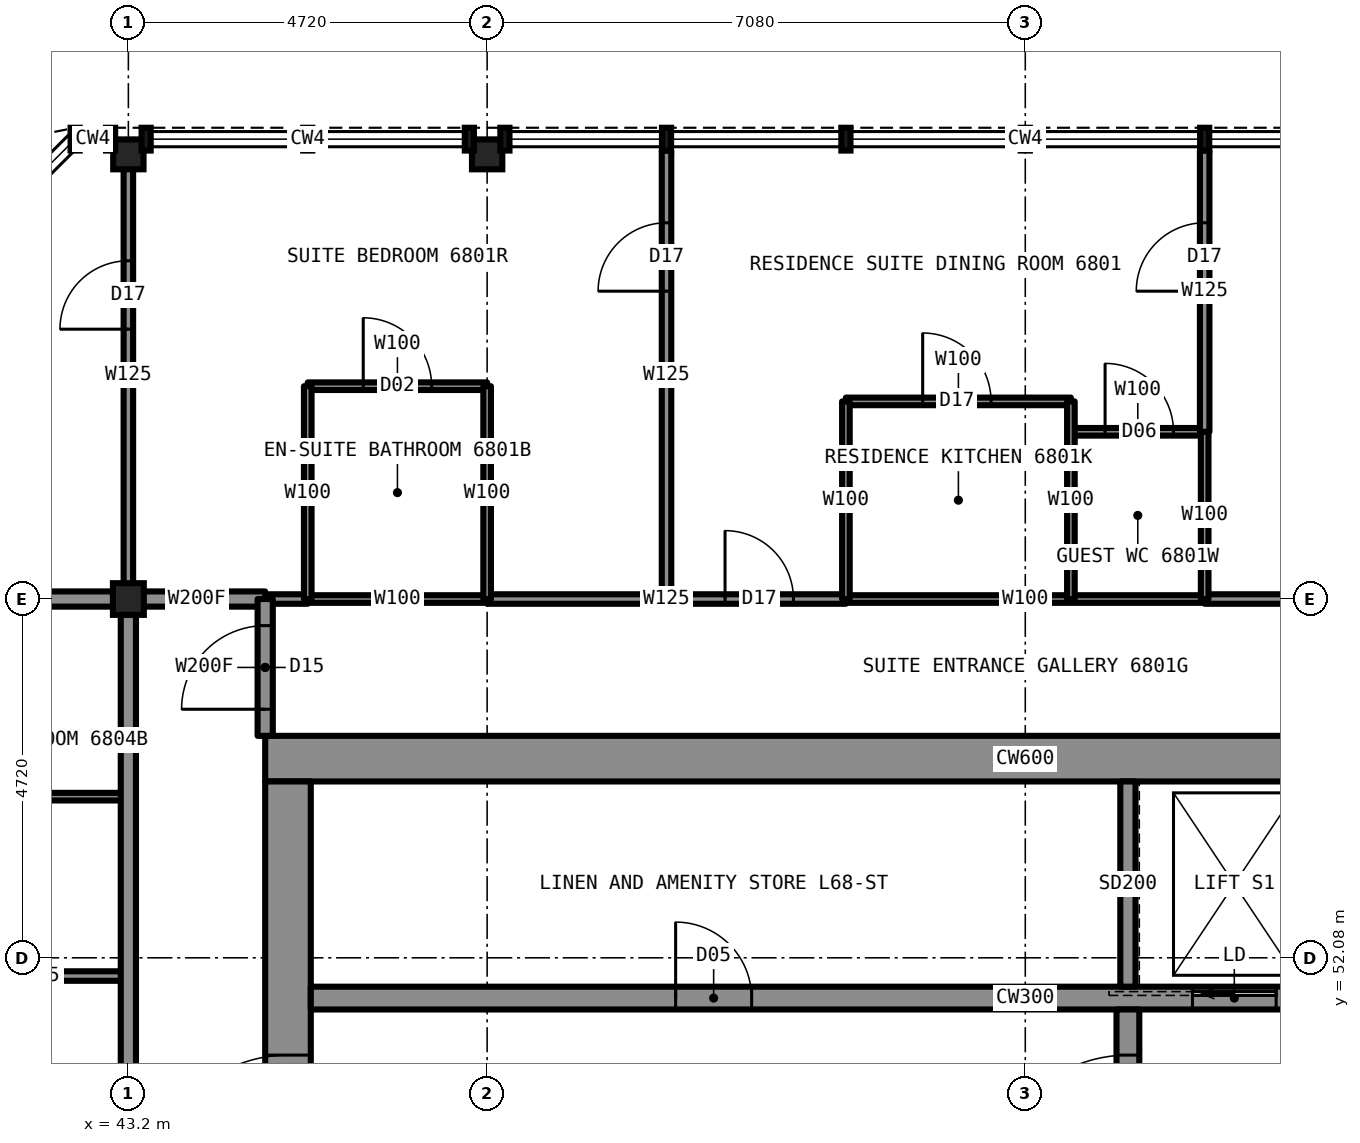
"""IFC4 building model, lengths in metres.
Left out: names, types, materials, properties, quantities, classifications, styles, units other than length and angle.
Written with IfcOpenShell. Run it as: python <this file> out.ifc"""

import sys

from ifc_helpers import new_model, si_unit, direction, frame, frame_2d, origin, origin_2d, place, context, subcontext, project, spatial, rectangle, i_section, extrude, element, fill, save


model = new_model("IFC4")
c1 = context("Model", 3, precision=1e-05, world=origin(), true_north=direction((0.0, 1.0)))
c2 = subcontext(c1, "Body", "Model", "MODEL_VIEW")
j1 = project(units=[si_unit("LENGTHUNIT", "METRE"), si_unit("PLANEANGLEUNIT", "RADIAN")], contexts=[c1])
p1 = place(None, origin())
s1 = spatial("IfcSite", under=j1, at=p1, CompositionType="ELEMENT")
p2 = place(p1, origin())
s2 = spatial("IfcBuilding", under=s1, at=p2, CompositionType="ELEMENT")
p3 = place(p2, frame((0.0, 0.0, 247.7)))
s3 = spatial("IfcBuildingStorey", under=s2, at=p3, CompositionType="ELEMENT", Elevation=247.7)
for number, where, z_axis, x_axis in (
    (1, (43.2, 62.65, 0.0), (0.0, 0.0, 1.0), (1.0, 0.0, 0.0)),
    (2, (47.92, 62.65, 0.0), (0.0, 0.0, 1.0), (1.0, 0.0, 0.0)),
):
    element("IfcColumn", number, at=place(p3, frame(where, z_axis=z_axis, x_axis=x_axis)), inside=s3, PredefinedType="COLUMN", context=c2, shape_type="SweptSolid", body=[
        extrude(i_section(OverallWidth=0.399, OverallDepth=0.394, WebThickness=0.023, FlangeThickness=0.037, at=origin_2d()), origin(), (0.0, 0.0, 1.0), 3.5),
    ])
p4 = place(p3, frame((43.2, 56.8, 0.0), z_axis=(0.0, 0.0, 1.0), x_axis=(1.0, 0.0, 0.0)))
e3 = element("IfcColumn", 3, at=p4, inside=s3, PredefinedType="COLUMN", context=c2, shape_type="SweptSolid", body=[
    extrude(i_section(OverallWidth=0.406, OverallDepth=0.417, WebThickness=0.03, FlangeThickness=0.048, at=origin_2d()), origin(), (0.0, 0.0, 1.0), 3.5),
])
p5 = place(p3, frame((45.0, 54.7, 0.0), z_axis=(0.0, 0.0, 1.0), x_axis=(1.0, 0.0, 0.0)))
e4 = element("IfcWall", 4, at=p5, inside=s3, PredefinedType="SHEAR", context=c2, shape_type="SweptSolid", body=[
    extrude(rectangle(XDim=20.0, YDim=0.6, at=frame_2d((10.0, 0.0))), origin(), (0.0, 0.0, 1.0), 3.5),
])
p6 = place(p3, frame((45.3, 35.6, 0.0), z_axis=(0.0, 0.0, 1.0), x_axis=(0.0, 1.0, 0.0)))
e5 = element("IfcWall", 5, at=p6, inside=s3, PredefinedType="SHEAR", context=c2, shape_type="SweptSolid", body=[
    extrude(rectangle(XDim=18.8, YDim=0.6, at=frame_2d((9.4, 0.0))), origin(), (0.0, 0.0, 1.0), 3.5),
])
p7 = place(p6, frame((13.4, 0.0, 0.0)))
e6 = element("IfcOpeningElement", 6, at=p7, cuts=e5, PredefinedType="OPENING", context=c2, shape_type="SweptSolid", body=[
    extrude(rectangle(XDim=1.8, YDim=2.2, at=frame_2d((0.9, 1.1))), frame((0.0, 0.31, 0.0), z_axis=(0.0, -1.0, 0.0), x_axis=(1.0, 0.0, 0.0)), (0.0, 0.0, 1.0), 0.62),
])
p8 = place(p6, frame((3.6, 0.0, 0.0)))
e7 = element("IfcOpeningElement", 7, at=p8, cuts=e5, PredefinedType="OPENING", context=c2, shape_type="SweptSolid", body=[
    extrude(rectangle(XDim=1.8, YDim=2.2, at=frame_2d((0.9, 1.1))), frame((0.0, 0.31, 0.0), z_axis=(0.0, -1.0, 0.0), x_axis=(1.0, 0.0, 0.0)), (0.0, 0.0, 1.0), 0.62),
])
p9 = place(p6, frame((6.4, 0.0, 0.0)))
e8 = element("IfcOpeningElement", 8, at=p9, cuts=e5, PredefinedType="OPENING", context=c2, shape_type="SweptSolid", body=[
    extrude(rectangle(XDim=1.2, YDim=2.2, at=frame_2d((0.6, 1.1))), frame((0.0, 0.31, 0.0), z_axis=(0.0, -1.0, 0.0), x_axis=(1.0, 0.0, 0.0)), (0.0, 0.0, 1.0), 0.62),
])
p10 = place(p3, frame((45.6, 51.55, 0.0), z_axis=(0.0, 0.0, 1.0), x_axis=(1.0, 0.0, 0.0)))
e9 = element("IfcWall", 9, at=p10, inside=s3, PredefinedType="SHEAR", context=c2, shape_type="SweptSolid", body=[
    extrude(rectangle(XDim=18.8, YDim=0.3, at=frame_2d((9.4, 0.0))), origin(), (0.0, 0.0, 1.0), 3.5),
])
p11 = place(p10, frame((4.8, 0.0, 0.0)))
e10 = element("IfcOpeningElement", 10, at=p11, cuts=e9, PredefinedType="OPENING", context=c2, shape_type="SweptSolid", body=[
    extrude(rectangle(XDim=1.0, YDim=2.1, at=frame_2d((0.5, 1.05))), frame((0.0, 0.16, 0.0), z_axis=(0.0, -1.0, 0.0), x_axis=(1.0, 0.0, 0.0)), (0.0, 0.0, 1.0), 0.32),
])
p12 = place(p10, frame((11.6, 0.0, 0.0)))
e11 = element("IfcOpeningElement", 11, at=p12, cuts=e9, PredefinedType="OPENING", context=c2, shape_type="SweptSolid", body=[
    extrude(rectangle(XDim=1.1, YDim=2.2, at=frame_2d((0.55, 1.1))), frame((0.0, 0.16, 0.0), z_axis=(0.0, -1.0, 0.0), x_axis=(1.0, 0.0, 0.0)), (0.0, 0.0, 1.0), 0.32),
])
p13 = place(p10, frame((14.3, 0.0, 0.0)))
e12 = element("IfcOpeningElement", 12, at=p13, cuts=e9, PredefinedType="OPENING", context=c2, shape_type="SweptSolid", body=[
    extrude(rectangle(XDim=1.1, YDim=2.2, at=frame_2d((0.55, 1.1))), frame((0.0, 0.16, 0.0), z_axis=(0.0, -1.0, 0.0), x_axis=(1.0, 0.0, 0.0)), (0.0, 0.0, 1.0), 0.32),
])
p14 = place(p3, frame((56.35, 41.9, 0.0), z_axis=(0.0, 0.0, 1.0), x_axis=(0.0, 1.0, 0.0)))
e13 = element("IfcWall", 13, at=p14, inside=s3, PredefinedType="SHEAR", context=c2, shape_type="SweptSolid", body=[
    extrude(rectangle(XDim=9.5, YDim=0.3, at=frame_2d((4.75, 0.0))), origin(), (0.0, 0.0, 1.0), 3.5),
])
p15 = place(p14, frame((7.1, 0.0, 0.0)))
e14 = element("IfcOpeningElement", 14, at=p15, cuts=e13, PredefinedType="OPENING", context=c2, shape_type="SweptSolid", body=[
    extrude(rectangle(XDim=1.8, YDim=2.2, at=frame_2d((0.9, 1.1))), frame((0.0, 0.16, 0.0), z_axis=(0.0, -1.0, 0.0), x_axis=(1.0, 0.0, 0.0)), (0.0, 0.0, 1.0), 0.32),
])
p16 = place(p3, frame((45.56, 56.8, 0.0), z_axis=(0.0, 0.0, 1.0), x_axis=(1.0, 0.0, 0.0)))
e15 = element("IfcWall", 15, at=p16, inside=s3, PredefinedType="PARTITIONING", context=c2, shape_type="SweptSolid", body=[
    extrude(rectangle(XDim=2.36, YDim=0.1, at=frame_2d((1.18, 0.0))), origin(), (0.0, 0.0, 1.0), 3.33),
])
p17 = place(p3, frame((52.64, 56.8, 0.0), z_axis=(0.0, 0.0, 1.0), x_axis=(1.0, 0.0, 0.0)))
e16 = element("IfcWall", 16, at=p17, inside=s3, PredefinedType="PARTITIONING", context=c2, shape_type="SweptSolid", body=[
    extrude(rectangle(XDim=4.72, YDim=0.1, at=frame_2d((2.36, 0.0))), origin(), (0.0, 0.0, 1.0), 3.33),
])
p18 = place(p3, frame((43.2, 56.8, 0.0), z_axis=(0.0, 0.0, 1.0), x_axis=(1.0, 0.0, 0.0)))
e17 = element("IfcWall", 17, at=p18, inside=s3, PredefinedType="PARTITIONING", context=c2, shape_type="SweptSolid", body=[
    extrude(rectangle(XDim=1.8, YDim=0.2, at=frame_2d((0.9, 0.0))), origin(), (0.0, 0.0, 1.0), 3.33),
])
p19 = place(p3, frame((37.3, 56.8, 0.0), z_axis=(0.0, 0.0, 1.0), x_axis=(1.0, 0.0, 0.0)))
e18 = element("IfcWall", 18, at=p19, inside=s3, PredefinedType="PARTITIONING", context=c2, shape_type="SweptSolid", body=[
    extrude(rectangle(XDim=5.9, YDim=0.2, at=frame_2d((2.95, 0.0))), origin(), (0.0, 0.0, 1.0), 2.573),
])
p20 = place(p3, frame((45.0, 56.8, 0.0), z_axis=(0.0, 0.0, 1.0), x_axis=(1.0, 0.0, 0.0)))
e19 = element("IfcWall", 19, at=p20, inside=s3, PredefinedType="PARTITIONING", context=c2, shape_type="SweptSolid", body=[
    extrude(rectangle(XDim=0.56, YDim=0.125, at=frame_2d((0.28, 0.0))), origin(), (0.0, 0.0, 1.0), 3.33),
])
p21 = place(p3, frame((47.92, 56.8, 0.0), z_axis=(0.0, 0.0, 1.0), x_axis=(1.0, 0.0, 0.0)))
e20 = element("IfcWall", 20, at=p21, inside=s3, PredefinedType="PARTITIONING", context=c2, shape_type="SweptSolid", body=[
    extrude(rectangle(XDim=4.72, YDim=0.125, at=frame_2d((2.36, 0.0))), origin(), (0.0, 0.0, 1.0), 3.33),
])
p22 = place(p21, frame((3.13, 0.0, 0.0)))
e21 = element("IfcOpeningElement", 21, at=p22, cuts=e20, PredefinedType="OPENING", context=c2, shape_type="SweptSolid", body=[
    extrude(rectangle(XDim=0.9, YDim=2.2, at=frame_2d((0.45, 1.1))), frame((0.0, 0.073, 0.0), z_axis=(0.0, -1.0, 0.0), x_axis=(1.0, 0.0, 0.0)), (0.0, 0.0, 1.0), 0.145),
])
p23 = place(p3, frame((57.36, 56.8, 0.0), z_axis=(0.0, 0.0, 1.0), x_axis=(1.0, 0.0, 0.0)))
e22 = element("IfcWall", 22, at=p23, inside=s3, PredefinedType="PARTITIONING", context=c2, shape_type="SweptSolid", body=[
    extrude(rectangle(XDim=7.08, YDim=0.125, at=frame_2d((3.54, 0.0))), origin(), (0.0, 0.0, 1.0), 3.33),
])
p24 = place(p3, frame((55.6, 59.0, 0.0), z_axis=(0.0, 0.0, 1.0), x_axis=(1.0, 0.0, 0.0)))
e23 = element("IfcWall", 23, at=p24, inside=s3, PredefinedType="PARTITIONING", context=c2, shape_type="SweptSolid", body=[
    extrude(rectangle(XDim=1.76, YDim=0.1, at=frame_2d((0.88, 0.0))), origin(), (0.0, 0.0, 1.0), 3.33),
])
p25 = place(p24, frame((0.45, 0.0, 0.0)))
e24 = element("IfcOpeningElement", 24, at=p25, cuts=e23, PredefinedType="OPENING", context=c2, shape_type="SweptSolid", body=[
    extrude(rectangle(XDim=0.9, YDim=2.1, at=frame_2d((0.45, 1.05))), frame((0.0, 0.06, 0.0), z_axis=(0.0, -1.0, 0.0), x_axis=(1.0, 0.0, 0.0)), (0.0, 0.0, 1.0), 0.12),
])
p26 = place(p3, frame((52.64, 59.4, 0.0), z_axis=(0.0, 0.0, 1.0), x_axis=(1.0, 0.0, 0.0)))
e25 = element("IfcWall", 25, at=p26, inside=s3, PredefinedType="PARTITIONING", context=c2, shape_type="SweptSolid", body=[
    extrude(rectangle(XDim=2.96, YDim=0.1, at=frame_2d((1.48, 0.0))), origin(), (0.0, 0.0, 1.0), 3.33),
])
p27 = place(p26, frame((1.01, 0.0, 0.0)))
e26 = element("IfcOpeningElement", 26, at=p27, cuts=e25, PredefinedType="OPENING", context=c2, shape_type="SweptSolid", body=[
    extrude(rectangle(XDim=0.9, YDim=2.2, at=frame_2d((0.45, 1.1))), frame((0.0, 0.06, 0.0), z_axis=(0.0, -1.0, 0.0), x_axis=(1.0, 0.0, 0.0)), (0.0, 0.0, 1.0), 0.12),
])
p28 = place(p3, frame((45.56, 59.6, 0.0), z_axis=(0.0, 0.0, 1.0), x_axis=(1.0, 0.0, 0.0)))
e27 = element("IfcWall", 27, at=p28, inside=s3, PredefinedType="PARTITIONING", context=c2, shape_type="SweptSolid", body=[
    extrude(rectangle(XDim=2.36, YDim=0.1, at=frame_2d((1.18, 0.0))), origin(), (0.0, 0.0, 1.0), 3.33),
])
p29 = place(p28, frame((0.73, 0.0, 0.0)))
e28 = element("IfcOpeningElement", 28, at=p29, cuts=e27, PredefinedType="OPENING", context=c2, shape_type="SweptSolid", body=[
    extrude(rectangle(XDim=0.9, YDim=2.1, at=frame_2d((0.45, 1.05))), frame((0.0, 0.06, 0.0), z_axis=(0.0, -1.0, 0.0), x_axis=(1.0, 0.0, 0.0)), (0.0, 0.0, 1.0), 0.12),
])
p30 = place(p3, frame((40.8, 51.84, 0.0), z_axis=(0.0, 0.0, 1.0), x_axis=(1.0, 0.0, 0.0)))
e29 = element("IfcWall", 29, at=p30, inside=s3, PredefinedType="PARTITIONING", context=c2, shape_type="SweptSolid", body=[
    extrude(rectangle(XDim=2.4, YDim=0.125, at=frame_2d((1.2, 0.0))), origin(), (0.0, 0.0, 1.0), 3.33),
])
p31 = place(p3, frame((40.2, 54.2, 0.0), z_axis=(0.0, 0.0, 1.0), x_axis=(1.0, 0.0, 0.0)))
e30 = element("IfcWall", 30, at=p31, inside=s3, PredefinedType="PARTITIONING", context=c2, shape_type="SweptSolid", body=[
    extrude(rectangle(XDim=3.0, YDim=0.1, at=frame_2d((1.5, 0.0))), origin(), (0.0, 0.0, 1.0), 3.33),
])
p32 = place(p3, frame((45.0, 55.0, 0.0), z_axis=(0.0, 0.0, 1.0), x_axis=(0.0, 1.0, 0.0)))
e31 = element("IfcWall", 31, at=p32, inside=s3, PredefinedType="PARTITIONING", context=c2, shape_type="SweptSolid", body=[
    extrude(rectangle(XDim=1.8, YDim=0.2, at=frame_2d((0.9, 0.0))), origin(), (0.0, 0.0, 1.0), 3.33),
])
p33 = place(p32, frame((0.35, 0.0, 0.0)))
e32 = element("IfcOpeningElement", 32, at=p33, cuts=e31, PredefinedType="OPENING", context=c2, shape_type="SweptSolid", body=[
    extrude(rectangle(XDim=1.1, YDim=2.2, at=frame_2d((0.55, 1.1))), frame((0.0, 0.11, 0.0), z_axis=(0.0, -1.0, 0.0), x_axis=(1.0, 0.0, 0.0)), (0.0, 0.0, 1.0), 0.22),
])
p34 = place(p3, frame((43.2, 33.2, 0.0), z_axis=(0.0, 0.0, 1.0), x_axis=(0.0, 1.0, 0.0)))
e33 = element("IfcWall", 33, at=p34, inside=s3, PredefinedType="PARTITIONING", context=c2, shape_type="SweptSolid", body=[
    extrude(rectangle(XDim=23.6, YDim=0.2, at=frame_2d((11.8, 0.0))), origin(), (0.0, 0.0, 1.0), 3.33),
])
p35 = place(p34, frame((8.95, 0.0, 0.0)))
e34 = element("IfcOpeningElement", 34, at=p35, cuts=e33, PredefinedType="OPENING", context=c2, shape_type="SweptSolid", body=[
    extrude(rectangle(XDim=1.1, YDim=2.2, at=frame_2d((0.55, 1.1))), frame((0.0, 0.11, 0.0), z_axis=(0.0, -1.0, 0.0), x_axis=(1.0, 0.0, 0.0)), (0.0, 0.0, 1.0), 0.22),
])
p36 = place(p34, frame((0.7, 0.0, 0.0)))
e35 = element("IfcOpeningElement", 35, at=p36, cuts=e33, PredefinedType="OPENING", context=c2, shape_type="SweptSolid", body=[
    extrude(rectangle(XDim=1.0, YDim=2.1, at=frame_2d((0.5, 1.05))), frame((0.0, 0.11, 0.0), z_axis=(0.0, -1.0, 0.0), x_axis=(1.0, 0.0, 0.0)), (0.0, 0.0, 1.0), 0.22),
])
p37 = place(p3, frame((43.2, 56.8, 0.0), z_axis=(0.0, 0.0, 1.0), x_axis=(0.0, 1.0, 0.0)))
e36 = element("IfcWall", 36, at=p37, inside=s3, PredefinedType="PARTITIONING", context=c2, shape_type="SweptSolid", body=[
    extrude(rectangle(XDim=5.9, YDim=0.125, at=frame_2d((2.95, 0.0))), origin(), (0.0, 0.0, 1.0), 2.573),
])
p38 = place(p37, frame((3.55, 0.0, 0.0)))
e37 = element("IfcOpeningElement", 37, at=p38, cuts=e36, PredefinedType="OPENING", context=c2, shape_type="SweptSolid", body=[
    extrude(rectangle(XDim=0.9, YDim=2.2, at=frame_2d((0.45, 1.1))), frame((0.0, 0.073, 0.0), z_axis=(0.0, -1.0, 0.0), x_axis=(1.0, 0.0, 0.0)), (0.0, 0.0, 1.0), 0.145),
])
p39 = place(p3, frame((52.64, 56.8, 0.0), z_axis=(0.0, 0.0, 1.0), x_axis=(0.0, 1.0, 0.0)))
e38 = element("IfcWall", 38, at=p39, inside=s3, PredefinedType="PARTITIONING", context=c2, shape_type="SweptSolid", body=[
    extrude(rectangle(XDim=2.6, YDim=0.1, at=frame_2d((1.3, 0.0))), origin(), (0.0, 0.0, 1.0), 3.33),
])
p40 = place(p3, frame((50.28, 56.8, 0.0), z_axis=(0.0, 0.0, 1.0), x_axis=(0.0, 1.0, 0.0)))
e39 = element("IfcWall", 39, at=p40, inside=s3, PredefinedType="PARTITIONING", context=c2, shape_type="SweptSolid", body=[
    extrude(rectangle(XDim=5.9, YDim=0.125, at=frame_2d((2.95, 0.0))), origin(), (0.0, 0.0, 1.0), 3.33),
])
p41 = place(p40, frame((4.05, 0.0, 0.0)))
e40 = element("IfcOpeningElement", 40, at=p41, cuts=e39, PredefinedType="OPENING", context=c2, shape_type="SweptSolid", body=[
    extrude(rectangle(XDim=0.9, YDim=2.2, at=frame_2d((0.45, 1.1))), frame((0.0, 0.073, 0.0), z_axis=(0.0, -1.0, 0.0), x_axis=(1.0, 0.0, 0.0)), (0.0, 0.0, 1.0), 0.145),
])
p42 = place(p3, frame((47.92, 56.8, 0.0), z_axis=(0.0, 0.0, 1.0), x_axis=(0.0, 1.0, 0.0)))
e41 = element("IfcWall", 41, at=p42, inside=s3, PredefinedType="PARTITIONING", context=c2, shape_type="SweptSolid", body=[
    extrude(rectangle(XDim=2.8, YDim=0.1, at=frame_2d((1.4, 0.0))), origin(), (0.0, 0.0, 1.0), 2.573),
])
p43 = place(p3, frame((45.56, 56.8, 0.0), z_axis=(0.0, 0.0, 1.0), x_axis=(0.0, 1.0, 0.0)))
e42 = element("IfcWall", 42, at=p43, inside=s3, PredefinedType="PARTITIONING", context=c2, shape_type="SweptSolid", body=[
    extrude(rectangle(XDim=2.8, YDim=0.1, at=frame_2d((1.4, 0.0))), origin(), (0.0, 0.0, 1.0), 3.33),
])
p44 = place(p3, frame((55.6, 56.8, 0.0), z_axis=(0.0, 0.0, 1.0), x_axis=(0.0, 1.0, 0.0)))
e43 = element("IfcWall", 43, at=p44, inside=s3, PredefinedType="PARTITIONING", context=c2, shape_type="SweptSolid", body=[
    extrude(rectangle(XDim=2.6, YDim=0.1, at=frame_2d((1.3, 0.0))), origin(), (0.0, 0.0, 1.0), 3.33),
])
p45 = place(p3, frame((57.36, 56.8, 0.0), z_axis=(0.0, 0.0, 1.0), x_axis=(0.0, 1.0, 0.0)))
e44 = element("IfcWall", 44, at=p45, inside=s3, PredefinedType="PARTITIONING", context=c2, shape_type="SweptSolid", body=[
    extrude(rectangle(XDim=2.2, YDim=0.1, at=frame_2d((1.1, 0.0))), origin(), (0.0, 0.0, 1.0), 3.33),
])
p46 = place(p3, frame((57.36, 59.0, 0.0), z_axis=(0.0, 0.0, 1.0), x_axis=(0.0, 1.0, 0.0)))
e45 = element("IfcWall", 45, at=p46, inside=s3, PredefinedType="PARTITIONING", context=c2, shape_type="SweptSolid", body=[
    extrude(rectangle(XDim=3.7, YDim=0.125, at=frame_2d((1.85, 0.0))), origin(), (0.0, 0.0, 1.0), 3.33),
])
p47 = place(p46, frame((1.85, 0.0, 0.0)))
e46 = element("IfcOpeningElement", 46, at=p47, cuts=e45, PredefinedType="OPENING", context=c2, shape_type="SweptSolid", body=[
    extrude(rectangle(XDim=0.9, YDim=2.2, at=frame_2d((0.45, 1.1))), frame((0.0, 0.073, 0.0), z_axis=(0.0, -1.0, 0.0), x_axis=(1.0, 0.0, 0.0)), (0.0, 0.0, 1.0), 0.145),
])
p48 = place(p3, frame((56.35, 51.7, 0.0), z_axis=(0.0, 0.0, 1.0), x_axis=(0.0, 1.0, 0.0)))
e47 = element("IfcWall", 47, at=p48, inside=s3, PredefinedType="PARTITIONING", context=c2, shape_type="SweptSolid", body=[
    extrude(rectangle(XDim=2.7, YDim=0.2, at=frame_2d((1.35, 0.0))), origin(), (0.0, 0.0, 1.0), 3.33),
])
p49 = place(p22, origin())
e48 = element("IfcDoor", 48, at=p49, inside=s3, OperationType="SINGLE_SWING_LEFT", PredefinedType="DOOR", context=c2, shape_type="SweptSolid", body=[
    extrude(rectangle(XDim=0.9, YDim=2.2, at=frame_2d((0.45, 1.1))), frame((0.0, 0.025, 0.0), z_axis=(0.0, -1.0, 0.0), x_axis=(1.0, 0.0, 0.0)), (0.0, 0.0, 1.0), 0.05),
])
fill(e21, e48)
p50 = place(p29, origin())
e49 = element("IfcDoor", 49, at=p50, inside=s3, OperationType="SINGLE_SWING_RIGHT", PredefinedType="DOOR", context=c2, shape_type="SweptSolid", body=[
    extrude(rectangle(XDim=0.9, YDim=2.1, at=frame_2d((0.45, 1.05))), frame((0.0, 0.025, 0.0), z_axis=(0.0, -1.0, 0.0), x_axis=(1.0, 0.0, 0.0)), (0.0, 0.0, 1.0), 0.05),
])
fill(e28, e49)
p51 = place(p33, origin())
e50 = element("IfcDoor", 50, at=p51, inside=s3, OperationType="SINGLE_SWING_LEFT", PredefinedType="DOOR", context=c2, shape_type="SweptSolid", body=[
    extrude(rectangle(XDim=1.1, YDim=2.2, at=frame_2d((0.55, 1.1))), frame((0.0, 0.025, 0.0), z_axis=(0.0, -1.0, 0.0), x_axis=(1.0, 0.0, 0.0)), (0.0, 0.0, 1.0), 0.05),
])
fill(e32, e50)
p52 = place(p27, origin())
e51 = element("IfcDoor", 51, at=p52, inside=s3, OperationType="SINGLE_SWING_LEFT", PredefinedType="DOOR", context=c2, shape_type="SweptSolid", body=[
    extrude(rectangle(XDim=0.9, YDim=2.2, at=frame_2d((0.45, 1.1))), frame((0.0, 0.025, 0.0), z_axis=(0.0, -1.0, 0.0), x_axis=(1.0, 0.0, 0.0)), (0.0, 0.0, 1.0), 0.05),
])
fill(e26, e51)
p53 = place(p47, origin())
e52 = element("IfcDoor", 52, at=p53, inside=s3, OperationType="SINGLE_SWING_LEFT", PredefinedType="DOOR", context=c2, shape_type="SweptSolid", body=[
    extrude(rectangle(XDim=0.9, YDim=2.2, at=frame_2d((0.45, 1.1))), frame((0.0, 0.025, 0.0), z_axis=(0.0, -1.0, 0.0), x_axis=(1.0, 0.0, 0.0)), (0.0, 0.0, 1.0), 0.05),
])
fill(e46, e52)
p54 = place(p41, origin())
e53 = element("IfcDoor", 53, at=p54, inside=s3, OperationType="SINGLE_SWING_LEFT", PredefinedType="DOOR", context=c2, shape_type="SweptSolid", body=[
    extrude(rectangle(XDim=0.9, YDim=2.2, at=frame_2d((0.45, 1.1))), frame((0.0, 0.025, 0.0), z_axis=(0.0, -1.0, 0.0), x_axis=(1.0, 0.0, 0.0)), (0.0, 0.0, 1.0), 0.05),
])
fill(e40, e53)
p55 = place(p38, origin())
e54 = element("IfcDoor", 54, at=p55, inside=s3, OperationType="SINGLE_SWING_LEFT", PredefinedType="DOOR", context=c2, shape_type="SweptSolid", body=[
    extrude(rectangle(XDim=0.9, YDim=2.2, at=frame_2d((0.45, 1.1))), frame((0.0, 0.025, 0.0), z_axis=(0.0, -1.0, 0.0), x_axis=(1.0, 0.0, 0.0)), (0.0, 0.0, 1.0), 0.05),
])
fill(e37, e54)
p56 = place(p25, origin())
e55 = element("IfcDoor", 55, at=p56, inside=s3, OperationType="SINGLE_SWING_LEFT", PredefinedType="DOOR", context=c2, shape_type="SweptSolid", body=[
    extrude(rectangle(XDim=0.9, YDim=2.1, at=frame_2d((0.45, 1.05))), frame((0.0, 0.025, 0.0), z_axis=(0.0, -1.0, 0.0), x_axis=(1.0, 0.0, 0.0)), (0.0, 0.0, 1.0), 0.05),
])
fill(e24, e55)
p57 = place(p7, origin())
e56 = element("IfcDoor", 56, at=p57, inside=s3, OperationType="DOUBLE_DOOR_SINGLE_SWING", PredefinedType="DOOR", context=c2, shape_type="SweptSolid", body=[
    extrude(rectangle(XDim=1.8, YDim=2.2, at=frame_2d((0.9, 1.1))), frame((0.0, 0.025, 0.0), z_axis=(0.0, -1.0, 0.0), x_axis=(1.0, 0.0, 0.0)), (0.0, 0.0, 1.0), 0.05),
])
fill(e6, e56)
p58 = place(p15, origin())
e57 = element("IfcDoor", 57, at=p58, inside=s3, OperationType="DOUBLE_DOOR_SINGLE_SWING", PredefinedType="DOOR", context=c2, shape_type="SweptSolid", body=[
    extrude(rectangle(XDim=1.8, YDim=2.2, at=frame_2d((0.9, 1.1))), frame((0.0, 0.025, 0.0), z_axis=(0.0, -1.0, 0.0), x_axis=(1.0, 0.0, 0.0)), (0.0, 0.0, 1.0), 0.05),
])
fill(e14, e57)
p59 = place(p11, origin())
e58 = element("IfcDoor", 58, at=p59, inside=s3, OperationType="SINGLE_SWING_LEFT", PredefinedType="DOOR", context=c2, shape_type="SweptSolid", body=[
    extrude(rectangle(XDim=1.0, YDim=2.1, at=frame_2d((0.5, 1.05))), frame((0.0, 0.025, 0.0), z_axis=(0.0, -1.0, 0.0), x_axis=(1.0, 0.0, 0.0)), (0.0, 0.0, 1.0), 0.05),
])
fill(e10, e58)
p60 = place(p12, origin())
e59 = element("IfcDoor", 59, at=p60, inside=s3, OperationType="SLIDING_TO_LEFT", PredefinedType="DOOR", context=c2, shape_type="SweptSolid", body=[
    extrude(rectangle(XDim=1.1, YDim=2.2, at=frame_2d((0.55, 1.1))), frame((0.0, 0.025, 0.0), z_axis=(0.0, -1.0, 0.0), x_axis=(1.0, 0.0, 0.0)), (0.0, 0.0, 1.0), 0.05),
])
fill(e11, e59)
save(model, sys.argv[1])
